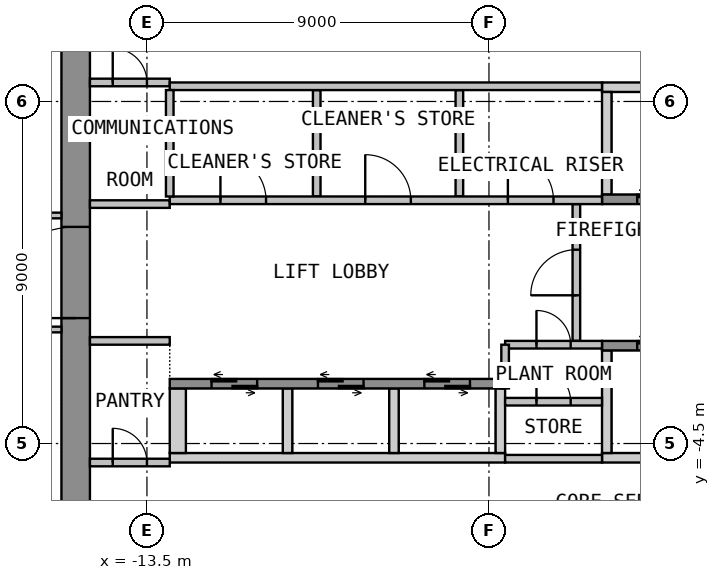
"""IFC4 building model, lengths in metres.
Left out: names, types, materials, properties, quantities, classifications, styles, units other than length and angle.
Written with IfcOpenShell. Run it as: python <this file> out.ifc"""

import sys

from ifc_helpers import new_model, si_unit, direction, frame, frame_2d, origin, place, context, subcontext, project, spatial, polyline, rectangle, outline, extrude, element, fill, save


model = new_model("IFC4")
c1 = context("Model", 3, precision=1e-05, world=origin(), true_north=direction((0.0, 1.0)))
c2 = subcontext(c1, "Body", "Model", "MODEL_VIEW")
j1 = project(units=[si_unit("LENGTHUNIT", "METRE"), si_unit("PLANEANGLEUNIT", "RADIAN")], contexts=[c1])
p1 = place(None, origin())
s1 = spatial("IfcSite", under=j1, at=p1, CompositionType="ELEMENT")
p2 = place(p1, origin())
s2 = spatial("IfcBuilding", under=s1, at=p2, CompositionType="ELEMENT")
p3 = place(p2, frame((0.0, 0.0, 144.3)))
s3 = spatial("IfcBuildingStorey", under=s2, at=p3, CompositionType="ELEMENT", Elevation=144.3)
p4 = place(p3, frame((-15.375, -12.75, 0.0), z_axis=(0.0, 0.0, 1.0), x_axis=(0.0, 1.0, 0.0)))
e1 = element("IfcWall", 1, at=p4, inside=s3, PredefinedType="SHEAR", context=c2, shape_type="SweptSolid", body=[
    extrude(rectangle(XDim=25.5, YDim=0.75, at=frame_2d((12.75, 0.0))), origin(), (0.0, 0.0, 1.0), 3.575),
])
p5 = place(p4, frame((11.55, 0.0, 0.0)))
e2 = element("IfcOpeningElement", 2, at=p5, cuts=e1, PredefinedType="OPENING", context=c2, shape_type="SweptSolid", body=[
    extrude(rectangle(XDim=2.4, YDim=2.1, at=frame_2d((1.2, 1.05))), frame((0.0, 0.385, 0.0), z_axis=(0.0, -1.0, 0.0), x_axis=(1.0, 0.0, 0.0)), (0.0, 0.0, 1.0), 0.77),
])
p6 = place(p3, origin())
e3 = element("IfcWall", 3, at=p6, inside=s3, PredefinedType="SHEAR", context=c2, shape_type="SweptSolid", body=[
    extrude(outline(polyline([(-1.525, 4.75), (1.525, 4.75), (1.525, 5.0), (-1.525, 5.0), (-1.525, 4.75)])), origin(), (0.0, 0.0, 1.0), 3.575),
])
p7 = place(p3, origin())
e4 = element("IfcWall", 4, at=p7, inside=s3, PredefinedType="SHEAR", context=c2, shape_type="SweptSolid", body=[
    extrude(outline(polyline([(-1.525, 2.05), (-1.275, 2.05), (-1.275, 4.75), (-1.525, 4.75), (-1.525, 2.05)])), origin(), (0.0, 0.0, 1.0), 3.575),
])
p8 = place(p3, frame((-1.525, 1.925, 0.0), z_axis=(0.0, 0.0, 1.0), x_axis=(1.0, 0.0, 0.0)))
e5 = element("IfcWall", 5, at=p8, inside=s3, PredefinedType="SHEAR", context=c2, shape_type="SweptSolid", body=[
    extrude(rectangle(XDim=3.05, YDim=0.25, at=frame_2d((1.525, 0.0))), origin(), (0.0, 0.0, 1.0), 3.575),
])
p9 = place(p8, frame((0.925, 0.0, 0.0)))
e6 = element("IfcOpeningElement", 6, at=p9, cuts=e5, PredefinedType="OPENING", context=c2, shape_type="SweptSolid", body=[
    extrude(rectangle(XDim=1.2, YDim=2.1, at=frame_2d((0.6, 1.05))), frame((0.0, 0.135, 0.0), z_axis=(0.0, -1.0, 0.0), x_axis=(1.0, 0.0, 0.0)), (0.0, 0.0, 1.0), 0.27),
])
p10 = place(p3, origin())
e7 = element("IfcWall", 7, at=p10, inside=s3, PredefinedType="SHEAR", context=c2, shape_type="SweptSolid", body=[
    extrude(outline(polyline([(-12.9, -5.0), (-4.075, -5.0), (-4.075, -4.75), (-12.9, -4.75), (-12.9, -5.0)])), origin(), (0.0, 0.0, 1.0), 3.575),
])
p11 = place(p3, origin())
e8 = element("IfcWall", 8, at=p11, inside=s3, PredefinedType="SHEAR", context=c2, shape_type="SweptSolid", body=[
    extrude(outline(polyline([(-1.525, -5.0), (12.9, -5.0), (12.9, -4.75), (-1.525, -4.75), (-1.525, -5.0)])), origin(), (0.0, 0.0, 1.0), 3.575),
])
p12 = place(p3, origin())
e9 = element("IfcWall", 9, at=p12, inside=s3, PredefinedType="SHEAR", context=c2, shape_type="SweptSolid", body=[
    extrude(outline(polyline([(-12.9, -4.75), (-12.475, -4.75), (-12.475, -3.05), (-12.9, -3.05), (-12.9, -4.75)])), origin(), (0.0, 0.0, 1.0), 3.575),
])
p13 = place(p3, origin())
e10 = element("IfcWall", 10, at=p13, inside=s3, PredefinedType="SHEAR", context=c2, shape_type="SweptSolid", body=[
    extrude(outline(polyline([(-9.925, -4.75), (-9.675, -4.75), (-9.675, -3.05), (-9.925, -3.05), (-9.925, -4.75)])), origin(), (0.0, 0.0, 1.0), 3.575),
])
p14 = place(p3, origin())
e11 = element("IfcWall", 11, at=p14, inside=s3, PredefinedType="SHEAR", context=c2, shape_type="SweptSolid", body=[
    extrude(outline(polyline([(-7.125, -4.75), (-6.875, -4.75), (-6.875, -3.05), (-7.125, -3.05), (-7.125, -4.75)])), origin(), (0.0, 0.0, 1.0), 3.575),
])
p15 = place(p3, origin())
e12 = element("IfcWall", 12, at=p15, inside=s3, PredefinedType="SHEAR", context=c2, shape_type="SweptSolid", body=[
    extrude(outline(polyline([(-4.325, -4.75), (-4.075, -4.75), (-4.075, -3.05), (-4.325, -3.05), (-4.325, -4.75)])), origin(), (0.0, 0.0, 1.0), 3.575),
])
p16 = place(p3, origin())
e13 = element("IfcWall", 13, at=p16, inside=s3, PredefinedType="SHEAR", context=c2, shape_type="SweptSolid", body=[
    extrude(outline(polyline([(-1.525, -4.75), (-1.275, -4.75), (-1.275, -2.05), (-1.525, -2.05), (-1.525, -4.75)])), origin(), (0.0, 0.0, 1.0), 3.575),
])
p17 = place(p3, frame((-12.9, -2.925, 0.0), z_axis=(0.0, 0.0, 1.0), x_axis=(1.0, 0.0, 0.0)))
e14 = element("IfcWall", 14, at=p17, inside=s3, PredefinedType="SHEAR", context=c2, shape_type="SweptSolid", body=[
    extrude(rectangle(XDim=8.825, YDim=0.25, at=frame_2d((4.413, 0.0))), origin(), (0.0, 0.0, 1.0), 3.575),
])
p18 = place(p17, frame((1.1, 0.0, 0.0)))
e15 = element("IfcOpeningElement", 15, at=p18, cuts=e14, PredefinedType="OPENING", context=c2, shape_type="SweptSolid", body=[
    extrude(rectangle(XDim=1.2, YDim=2.1, at=frame_2d((0.6, 1.05))), frame((0.0, 0.135, 0.0), z_axis=(0.0, -1.0, 0.0), x_axis=(1.0, 0.0, 0.0)), (0.0, 0.0, 1.0), 0.27),
])
p19 = place(p17, frame((3.9, 0.0, 0.0)))
e16 = element("IfcOpeningElement", 16, at=p19, cuts=e14, PredefinedType="OPENING", context=c2, shape_type="SweptSolid", body=[
    extrude(rectangle(XDim=1.2, YDim=2.1, at=frame_2d((0.6, 1.05))), frame((0.0, 0.135, 0.0), z_axis=(0.0, -1.0, 0.0), x_axis=(1.0, 0.0, 0.0)), (0.0, 0.0, 1.0), 0.27),
])
p20 = place(p17, frame((6.7, 0.0, 0.0)))
e17 = element("IfcOpeningElement", 17, at=p20, cuts=e14, PredefinedType="OPENING", context=c2, shape_type="SweptSolid", body=[
    extrude(rectangle(XDim=1.2, YDim=2.1, at=frame_2d((0.6, 1.05))), frame((0.0, 0.135, 0.0), z_axis=(0.0, -1.0, 0.0), x_axis=(1.0, 0.0, 0.0)), (0.0, 0.0, 1.0), 0.27),
])
p21 = place(p3, frame((-1.525, -1.925, 0.0), z_axis=(0.0, 0.0, 1.0), x_axis=(1.0, 0.0, 0.0)))
e18 = element("IfcWall", 18, at=p21, inside=s3, PredefinedType="SHEAR", context=c2, shape_type="SweptSolid", body=[
    extrude(rectangle(XDim=14.425, YDim=0.25, at=frame_2d((7.212, 0.0))), origin(), (0.0, 0.0, 1.0), 3.575),
])
p22 = place(p21, frame((0.925, 0.0, 0.0)))
e19 = element("IfcOpeningElement", 19, at=p22, cuts=e18, PredefinedType="OPENING", context=c2, shape_type="SweptSolid", body=[
    extrude(rectangle(XDim=1.2, YDim=2.1, at=frame_2d((0.6, 1.05))), frame((0.0, 0.135, 0.0), z_axis=(0.0, -1.0, 0.0), x_axis=(1.0, 0.0, 0.0)), (0.0, 0.0, 1.0), 0.27),
])
p23 = place(p21, frame((3.725, 0.0, 0.0)))
e20 = element("IfcOpeningElement", 20, at=p23, cuts=e18, PredefinedType="OPENING", context=c2, shape_type="SweptSolid", body=[
    extrude(rectangle(XDim=1.2, YDim=2.1, at=frame_2d((0.6, 1.05))), frame((0.0, 0.135, 0.0), z_axis=(0.0, -1.0, 0.0), x_axis=(1.0, 0.0, 0.0)), (0.0, 0.0, 1.0), 0.27),
])
p24 = place(p3, frame((-2.2, -1.8, 0.0), z_axis=(0.0, 0.0, 1.0), x_axis=(0.0, 1.0, 0.0)))
e21 = element("IfcWall", 21, at=p24, inside=s3, PredefinedType="PARTITIONING", context=c2, shape_type="SweptSolid", body=[
    extrude(rectangle(XDim=3.6, YDim=0.2, at=frame_2d((1.8, 0.0))), origin(), (0.0, 0.0, 1.0), 3.575),
])
p25 = place(p24, frame((1.2, 0.0, 0.0)))
e22 = element("IfcOpeningElement", 22, at=p25, cuts=e21, PredefinedType="OPENING", context=c2, shape_type="SweptSolid", body=[
    extrude(rectangle(XDim=1.2, YDim=2.1, at=frame_2d((0.6, 1.05))), frame((0.0, 0.11, 0.0), z_axis=(0.0, -1.0, 0.0), x_axis=(1.0, 0.0, 0.0)), (0.0, 0.0, 1.0), 0.22),
])
p26 = place(p3, frame((-15.0, 5.0, 0.0), z_axis=(0.0, 0.0, 1.0), x_axis=(1.0, 0.0, 0.0)))
e23 = element("IfcWall", 23, at=p26, inside=s3, PredefinedType="PARTITIONING", context=c2, shape_type="SweptSolid", body=[
    extrude(rectangle(XDim=2.1, YDim=0.2, at=frame_2d((1.05, 0.0))), origin(), (0.0, 0.0, 1.0), 3.575),
])
p27 = place(p26, frame((0.6, 0.0, 0.0)))
e24 = element("IfcOpeningElement", 24, at=p27, cuts=e23, PredefinedType="OPENING", context=c2, shape_type="SweptSolid", body=[
    extrude(rectangle(XDim=0.9, YDim=2.1, at=frame_2d((0.45, 1.05))), frame((0.0, 0.11, 0.0), z_axis=(0.0, -1.0, 0.0), x_axis=(1.0, 0.0, 0.0)), (0.0, 0.0, 1.0), 0.22),
])
p28 = place(p3, frame((-15.0, 1.8, 0.0), z_axis=(0.0, 0.0, 1.0), x_axis=(1.0, 0.0, 0.0)))
e25 = element("IfcWall", 25, at=p28, inside=s3, PredefinedType="PARTITIONING", context=c2, shape_type="SweptSolid", body=[
    extrude(rectangle(XDim=2.1, YDim=0.2, at=frame_2d((1.05, 0.0))), origin(), (0.0, 0.0, 1.0), 3.575),
])
p29 = place(p3, frame((-15.0, -5.0, 0.0), z_axis=(0.0, 0.0, 1.0), x_axis=(1.0, 0.0, 0.0)))
e26 = element("IfcWall", 26, at=p29, inside=s3, PredefinedType="PARTITIONING", context=c2, shape_type="SweptSolid", body=[
    extrude(rectangle(XDim=2.1, YDim=0.2, at=frame_2d((1.05, 0.0))), origin(), (0.0, 0.0, 1.0), 3.575),
])
p30 = place(p29, frame((0.6, 0.0, 0.0)))
e27 = element("IfcOpeningElement", 27, at=p30, cuts=e26, PredefinedType="OPENING", context=c2, shape_type="SweptSolid", body=[
    extrude(rectangle(XDim=0.9, YDim=2.1, at=frame_2d((0.45, 1.05))), frame((0.0, 0.11, 0.0), z_axis=(0.0, -1.0, 0.0), x_axis=(1.0, 0.0, 0.0)), (0.0, 0.0, 1.0), 0.22),
])
p31 = place(p3, frame((-15.0, -1.8, 0.0), z_axis=(0.0, 0.0, 1.0), x_axis=(1.0, 0.0, 0.0)))
e28 = element("IfcWall", 28, at=p31, inside=s3, PredefinedType="PARTITIONING", context=c2, shape_type="SweptSolid", body=[
    extrude(rectangle(XDim=2.1, YDim=0.2, at=frame_2d((1.05, 0.0))), origin(), (0.0, 0.0, 1.0), 3.575),
])
for number, where, z_axis, x_axis in (
    (29, (-9.032, 2.0, 0.0), (0.0, 0.0, 1.0), (0.0, 1.0, 0.0)),
    (30, (-5.279, 2.0, 0.0), (0.0, 0.0, 1.0), (0.0, 1.0, 0.0)),
):
    element("IfcWall", number, at=place(p3, frame(where, z_axis=z_axis, x_axis=x_axis)), inside=s3, PredefinedType="PARTITIONING", context=c2, shape_type="SweptSolid", body=[
        extrude(rectangle(XDim=2.8, YDim=0.2, at=frame_2d((1.4, 0.0))), origin(), (0.0, 0.0, 1.0), 3.575),
    ])
p32 = place(p3, frame((-12.9, 1.9, 0.0), z_axis=(0.0, 0.0, 1.0), x_axis=(1.0, 0.0, 0.0)))
e31 = element("IfcWall", 31, at=p32, inside=s3, PredefinedType="PARTITIONING", context=c2, shape_type="SweptSolid", body=[
    extrude(rectangle(XDim=11.375, YDim=0.2, at=frame_2d((5.688, 0.0))), origin(), (0.0, 0.0, 1.0), 3.575),
])
p33 = place(p32, frame((1.334, 0.0, 0.0)))
e32 = element("IfcOpeningElement", 32, at=p33, cuts=e31, PredefinedType="OPENING", context=c2, shape_type="SweptSolid", body=[
    extrude(rectangle(XDim=1.2, YDim=2.1, at=frame_2d((0.6, 1.05))), frame((0.0, 0.11, 0.0), z_axis=(0.0, -1.0, 0.0), x_axis=(1.0, 0.0, 0.0)), (0.0, 0.0, 1.0), 0.22),
])
p34 = place(p32, frame((5.144, 0.0, 0.0)))
e33 = element("IfcOpeningElement", 33, at=p34, cuts=e31, PredefinedType="OPENING", context=c2, shape_type="SweptSolid", body=[
    extrude(rectangle(XDim=1.2, YDim=2.1, at=frame_2d((0.6, 1.05))), frame((0.0, 0.11, 0.0), z_axis=(0.0, -1.0, 0.0), x_axis=(1.0, 0.0, 0.0)), (0.0, 0.0, 1.0), 0.22),
])
p35 = place(p32, frame((8.898, 0.0, 0.0)))
e34 = element("IfcOpeningElement", 34, at=p35, cuts=e31, PredefinedType="OPENING", context=c2, shape_type="SweptSolid", body=[
    extrude(rectangle(XDim=1.2, YDim=2.1, at=frame_2d((0.6, 1.05))), frame((0.0, 0.11, 0.0), z_axis=(0.0, -1.0, 0.0), x_axis=(1.0, 0.0, 0.0)), (0.0, 0.0, 1.0), 0.22),
])
p36 = place(p3, frame((-12.9, 4.9, 0.0), z_axis=(0.0, 0.0, 1.0), x_axis=(1.0, 0.0, 0.0)))
e35 = element("IfcWall", 35, at=p36, inside=s3, PredefinedType="PARTITIONING", context=c2, shape_type="SweptSolid", body=[
    extrude(rectangle(XDim=11.375, YDim=0.2, at=frame_2d((5.688, 0.0))), origin(), (0.0, 0.0, 1.0), 3.575),
])
p37 = place(p3, frame((-12.9, 2.0, 0.0), z_axis=(0.0, 0.0, 1.0), x_axis=(0.0, 1.0, 0.0)))
e36 = element("IfcWall", 36, at=p37, inside=s3, PredefinedType="PARTITIONING", context=c2, shape_type="SweptSolid", body=[
    extrude(rectangle(XDim=2.8, YDim=0.2, at=frame_2d((1.4, 0.0))), origin(), (0.0, 0.0, 1.0), 3.575),
])
p38 = place(p3, frame((-4.075, -3.4, 0.0), z_axis=(0.0, 0.0, 1.0), x_axis=(1.0, 0.0, 0.0)))
e37 = element("IfcWall", 37, at=p38, inside=s3, PredefinedType="PARTITIONING", context=c2, shape_type="SweptSolid", body=[
    extrude(rectangle(XDim=2.55, YDim=0.2, at=frame_2d((1.275, 0.0))), origin(), (0.0, 0.0, 1.0), 3.575),
])
p39 = place(p38, frame((0.825, 0.0, 0.0)))
e38 = element("IfcOpeningElement", 38, at=p39, cuts=e37, PredefinedType="OPENING", context=c2, shape_type="SweptSolid", body=[
    extrude(rectangle(XDim=0.9, YDim=2.1, at=frame_2d((0.45, 1.05))), frame((0.0, 0.11, 0.0), z_axis=(0.0, -1.0, 0.0), x_axis=(1.0, 0.0, 0.0)), (0.0, 0.0, 1.0), 0.22),
])
p40 = place(p3, frame((-4.075, -1.9, 0.0), z_axis=(0.0, 0.0, 1.0), x_axis=(1.0, 0.0, 0.0)))
e39 = element("IfcWall", 39, at=p40, inside=s3, PredefinedType="PARTITIONING", context=c2, shape_type="SweptSolid", body=[
    extrude(rectangle(XDim=2.55, YDim=0.2, at=frame_2d((1.275, 0.0))), origin(), (0.0, 0.0, 1.0), 3.575),
])
p41 = place(p40, frame((0.825, 0.0, 0.0)))
e40 = element("IfcOpeningElement", 40, at=p41, cuts=e39, PredefinedType="OPENING", context=c2, shape_type="SweptSolid", body=[
    extrude(rectangle(XDim=0.9, YDim=2.1, at=frame_2d((0.45, 1.05))), frame((0.0, 0.11, 0.0), z_axis=(0.0, -1.0, 0.0), x_axis=(1.0, 0.0, 0.0)), (0.0, 0.0, 1.0), 0.22),
])
p42 = place(p3, frame((-4.075, -4.9, 0.0), z_axis=(0.0, 0.0, 1.0), x_axis=(1.0, 0.0, 0.0)))
e41 = element("IfcWall", 41, at=p42, inside=s3, PredefinedType="PARTITIONING", context=c2, shape_type="SweptSolid", body=[
    extrude(rectangle(XDim=2.55, YDim=0.2, at=frame_2d((1.275, 0.0))), origin(), (0.0, 0.0, 1.0), 3.575),
])
p43 = place(p3, frame((-4.075, -1.9, 0.0), z_axis=(0.0, 0.0, 1.0), x_axis=(0.0, -1.0, 0.0)))
e42 = element("IfcWall", 42, at=p43, inside=s3, PredefinedType="PARTITIONING", context=c2, shape_type="SweptSolid", body=[
    extrude(rectangle(XDim=1.15, YDim=0.2, at=frame_2d((0.575, 0.0))), origin(), (0.0, 0.0, 1.0), 3.575),
])
for number, where, z_axis, x_axis in (
    (43, (-18.675, -1.5, 0.0), (0.0, 0.0, 1.0), (1.0, 0.0, 0.0)),
    (44, (-15.75, 1.5, 0.0), (0.0, 0.0, 1.0), (-1.0, 0.0, 0.0)),
):
    element("IfcWall", number, at=place(p3, frame(where, z_axis=z_axis, x_axis=x_axis)), inside=s3, PredefinedType="PARTITIONING", context=c2, shape_type="SweptSolid", body=[
        extrude(rectangle(XDim=2.925, YDim=0.15, at=frame_2d((1.462, 0.0))), origin(), (0.0, 0.0, 1.0), 3.575),
    ])
p44 = place(p5, origin())
e45 = element("IfcDoor", 45, at=p44, inside=s3, OperationType="DOUBLE_DOOR_DOUBLE_SWING", PredefinedType="DOOR", context=c2, shape_type="SweptSolid", body=[
    extrude(rectangle(XDim=2.4, YDim=2.1, at=frame_2d((1.2, 1.05))), frame((0.0, 0.025, 0.0), z_axis=(0.0, -1.0, 0.0), x_axis=(1.0, 0.0, 0.0)), (0.0, 0.0, 1.0), 0.05),
])
fill(e2, e45)
p45 = place(p9, origin())
e46 = element("IfcDoor", 46, at=p45, inside=s3, OperationType="DOUBLE_DOOR_SLIDING", PredefinedType="DOOR", context=c2, shape_type="SweptSolid", body=[
    extrude(rectangle(XDim=1.2, YDim=2.1, at=frame_2d((0.6, 1.05))), frame((0.0, 0.025, 0.0), z_axis=(0.0, -1.0, 0.0), x_axis=(1.0, 0.0, 0.0)), (0.0, 0.0, 1.0), 0.05),
])
fill(e6, e46)
p46 = place(p18, origin())
e47 = element("IfcDoor", 47, at=p46, inside=s3, OperationType="DOUBLE_DOOR_SLIDING", PredefinedType="DOOR", context=c2, shape_type="SweptSolid", body=[
    extrude(rectangle(XDim=1.2, YDim=2.1, at=frame_2d((0.6, 1.05))), frame((0.0, 0.025, 0.0), z_axis=(0.0, -1.0, 0.0), x_axis=(1.0, 0.0, 0.0)), (0.0, 0.0, 1.0), 0.05),
])
fill(e15, e47)
p47 = place(p19, origin())
e48 = element("IfcDoor", 48, at=p47, inside=s3, OperationType="DOUBLE_DOOR_SLIDING", PredefinedType="DOOR", context=c2, shape_type="SweptSolid", body=[
    extrude(rectangle(XDim=1.2, YDim=2.1, at=frame_2d((0.6, 1.05))), frame((0.0, 0.025, 0.0), z_axis=(0.0, -1.0, 0.0), x_axis=(1.0, 0.0, 0.0)), (0.0, 0.0, 1.0), 0.05),
])
fill(e16, e48)
p48 = place(p20, origin())
e49 = element("IfcDoor", 49, at=p48, inside=s3, OperationType="DOUBLE_DOOR_SLIDING", PredefinedType="DOOR", context=c2, shape_type="SweptSolid", body=[
    extrude(rectangle(XDim=1.2, YDim=2.1, at=frame_2d((0.6, 1.05))), frame((0.0, 0.025, 0.0), z_axis=(0.0, -1.0, 0.0), x_axis=(1.0, 0.0, 0.0)), (0.0, 0.0, 1.0), 0.05),
])
fill(e17, e49)
p49 = place(p22, origin())
e50 = element("IfcDoor", 50, at=p49, inside=s3, OperationType="DOUBLE_DOOR_SLIDING", PredefinedType="DOOR", context=c2, shape_type="SweptSolid", body=[
    extrude(rectangle(XDim=1.2, YDim=2.1, at=frame_2d((0.6, 1.05))), frame((0.0, 0.025, 0.0), z_axis=(0.0, -1.0, 0.0), x_axis=(1.0, 0.0, 0.0)), (0.0, 0.0, 1.0), 0.05),
])
fill(e19, e50)
p50 = place(p25, origin())
e51 = element("IfcDoor", 51, at=p50, inside=s3, OperationType="SINGLE_SWING_LEFT", PredefinedType="DOOR", context=c2, shape_type="SweptSolid", body=[
    extrude(rectangle(XDim=1.2, YDim=2.1, at=frame_2d((0.6, 1.05))), frame((0.0, 0.025, 0.0), z_axis=(0.0, -1.0, 0.0), x_axis=(1.0, 0.0, 0.0)), (0.0, 0.0, 1.0), 0.05),
])
fill(e22, e51)
p51 = place(p27, origin())
e52 = element("IfcDoor", 52, at=p51, inside=s3, OperationType="SINGLE_SWING_LEFT", PredefinedType="DOOR", context=c2, shape_type="SweptSolid", body=[
    extrude(rectangle(XDim=0.9, YDim=2.1, at=frame_2d((0.45, 1.05))), frame((0.0, 0.025, 0.0), z_axis=(0.0, -1.0, 0.0), x_axis=(1.0, 0.0, 0.0)), (0.0, 0.0, 1.0), 0.05),
])
fill(e24, e52)
p52 = place(p30, origin())
e53 = element("IfcDoor", 53, at=p52, inside=s3, OperationType="SINGLE_SWING_LEFT", PredefinedType="DOOR", context=c2, shape_type="SweptSolid", body=[
    extrude(rectangle(XDim=0.9, YDim=2.1, at=frame_2d((0.45, 1.05))), frame((0.0, 0.025, 0.0), z_axis=(0.0, -1.0, 0.0), x_axis=(1.0, 0.0, 0.0)), (0.0, 0.0, 1.0), 0.05),
])
fill(e27, e53)
p53 = place(p33, origin())
e54 = element("IfcDoor", 54, at=p53, inside=s3, OperationType="SINGLE_SWING_RIGHT", PredefinedType="DOOR", context=c2, shape_type="SweptSolid", body=[
    extrude(rectangle(XDim=1.2, YDim=2.1, at=frame_2d((0.6, 1.05))), frame((0.0, 0.025, 0.0), z_axis=(0.0, -1.0, 0.0), x_axis=(1.0, 0.0, 0.0)), (0.0, 0.0, 1.0), 0.05),
])
fill(e32, e54)
p54 = place(p34, origin())
e55 = element("IfcDoor", 55, at=p54, inside=s3, OperationType="SINGLE_SWING_RIGHT", PredefinedType="DOOR", context=c2, shape_type="SweptSolid", body=[
    extrude(rectangle(XDim=1.2, YDim=2.1, at=frame_2d((0.6, 1.05))), frame((0.0, 0.025, 0.0), z_axis=(0.0, -1.0, 0.0), x_axis=(1.0, 0.0, 0.0)), (0.0, 0.0, 1.0), 0.05),
])
fill(e33, e55)
p55 = place(p35, origin())
e56 = element("IfcDoor", 56, at=p55, inside=s3, OperationType="SINGLE_SWING_RIGHT", PredefinedType="DOOR", context=c2, shape_type="SweptSolid", body=[
    extrude(rectangle(XDim=1.2, YDim=2.1, at=frame_2d((0.6, 1.05))), frame((0.0, 0.025, 0.0), z_axis=(0.0, -1.0, 0.0), x_axis=(1.0, 0.0, 0.0)), (0.0, 0.0, 1.0), 0.05),
])
fill(e34, e56)
p56 = place(p39, origin())
e57 = element("IfcDoor", 57, at=p56, inside=s3, OperationType="SINGLE_SWING_LEFT", PredefinedType="DOOR", context=c2, shape_type="SweptSolid", body=[
    extrude(rectangle(XDim=0.9, YDim=2.1, at=frame_2d((0.45, 1.05))), frame((0.0, 0.025, 0.0), z_axis=(0.0, -1.0, 0.0), x_axis=(1.0, 0.0, 0.0)), (0.0, 0.0, 1.0), 0.05),
])
fill(e38, e57)
p57 = place(p41, origin())
e58 = element("IfcDoor", 58, at=p57, inside=s3, OperationType="SINGLE_SWING_LEFT", PredefinedType="DOOR", context=c2, shape_type="SweptSolid", body=[
    extrude(rectangle(XDim=0.9, YDim=2.1, at=frame_2d((0.45, 1.05))), frame((0.0, 0.025, 0.0), z_axis=(0.0, -1.0, 0.0), x_axis=(1.0, 0.0, 0.0)), (0.0, 0.0, 1.0), 0.05),
])
fill(e40, e58)
save(model, sys.argv[1])
